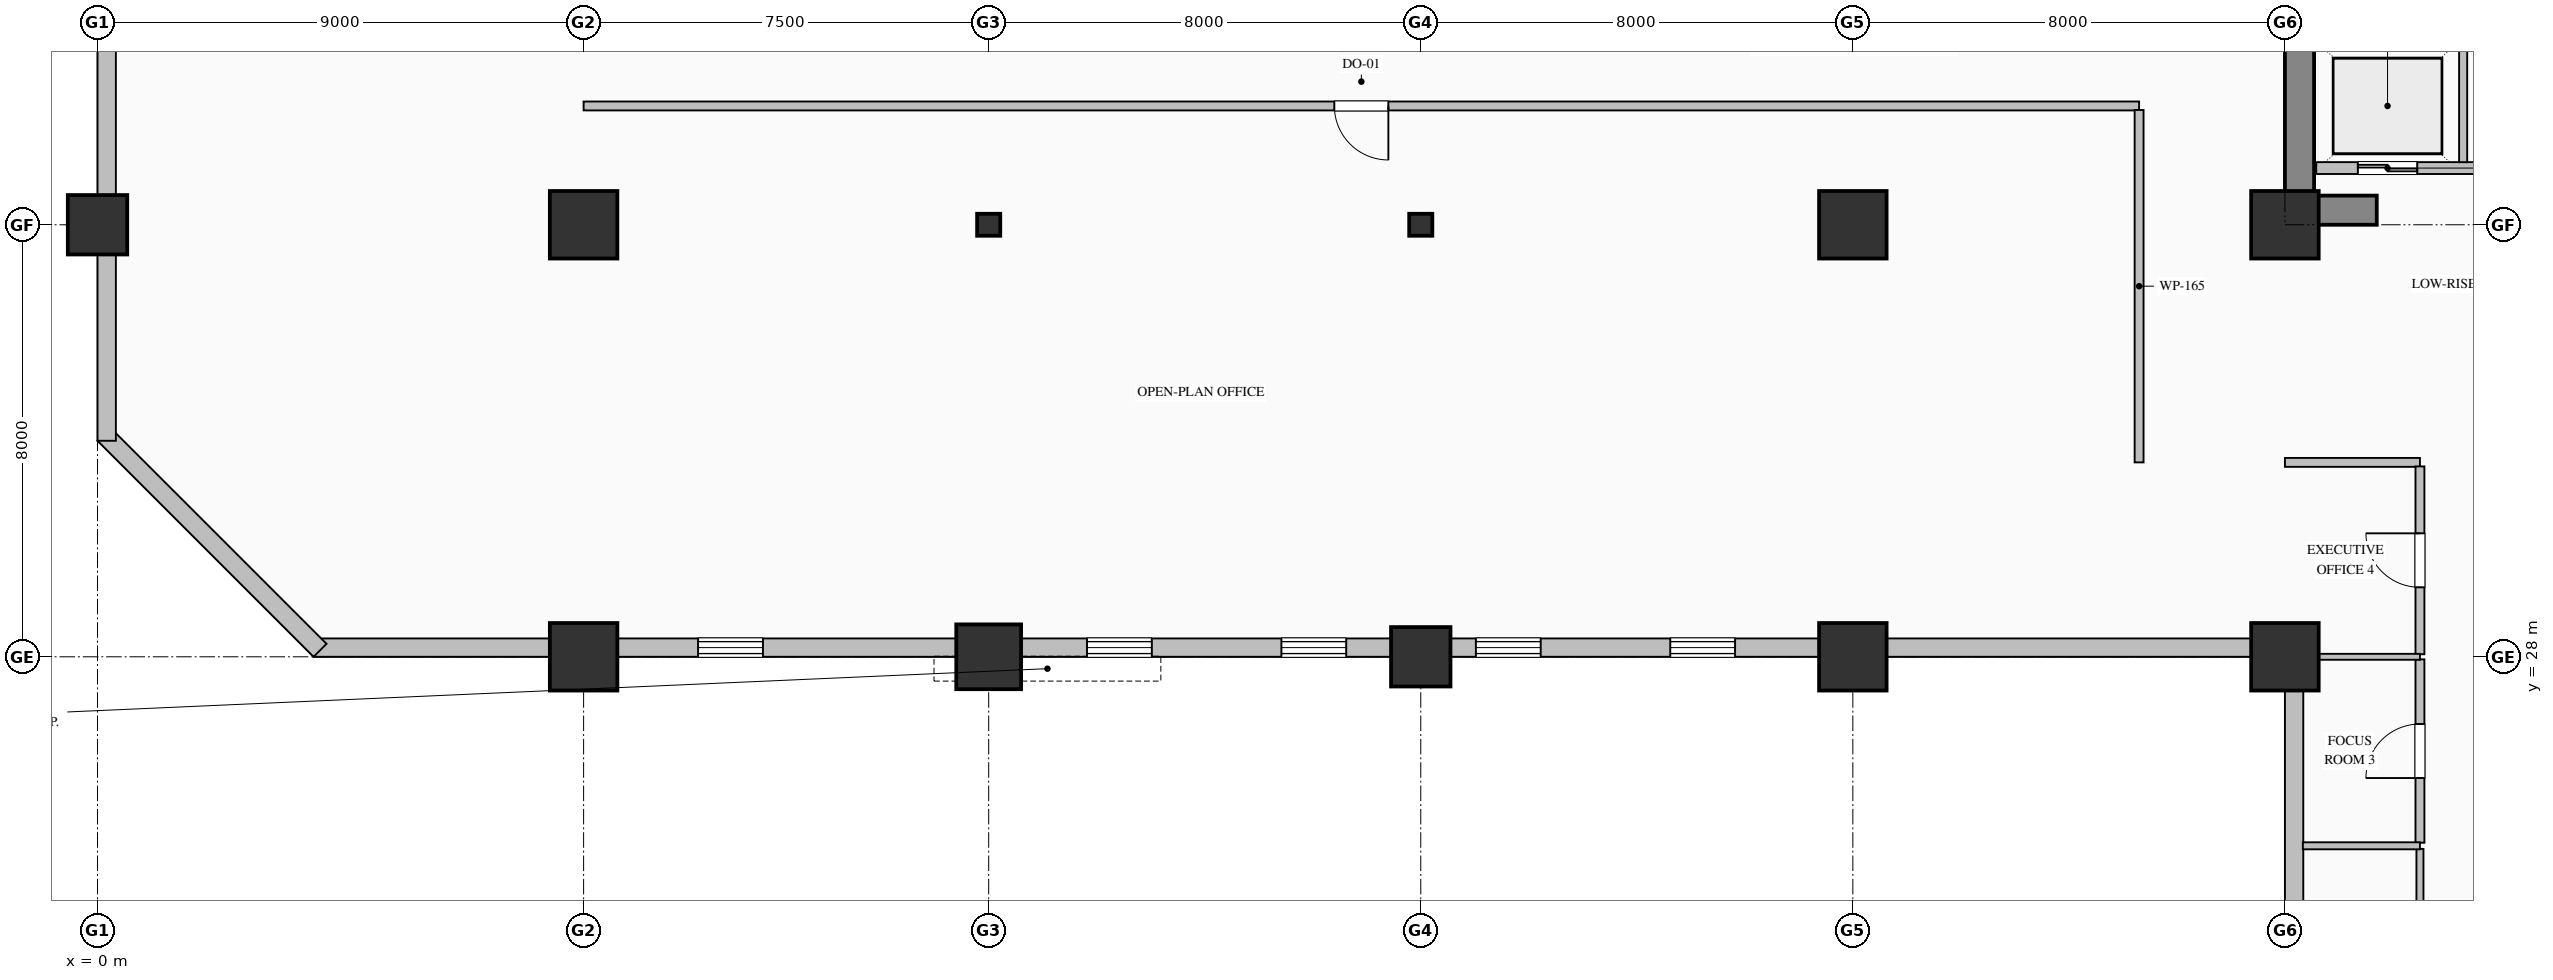
"""IFC4 building model, lengths in metres.
Left out: names, types, materials, properties, quantities, classifications, styles, units other than length and angle.
Written with IfcOpenShell. Run it as: python <this file> out.ifc"""

import sys

from ifc_helpers import new_model, si_unit, direction, frame, frame_2d, origin, origin_2d, place, context, subcontext, project, spatial, rectangle, hollow_rectangle, hollow_circle, i_section, extrude, element, fill, save


model = new_model("IFC4")
c1 = context("Model", 3, precision=1e-05, world=origin(), true_north=direction((0.0, 1.0)))
c2 = subcontext(c1, "Body", "Model", "MODEL_VIEW")
j1 = project(units=[si_unit("LENGTHUNIT", "METRE"), si_unit("PLANEANGLEUNIT", "RADIAN")], contexts=[c1])
p1 = place(None, origin())
s1 = spatial("IfcSite", under=j1, at=p1, CompositionType="ELEMENT")
p2 = place(p1, origin())
s2 = spatial("IfcBuilding", under=s1, at=p2, CompositionType="ELEMENT")
p3 = place(p2, frame((0.0, 0.0, 40.2)))
s3 = spatial("IfcBuildingStorey", under=s2, at=p3, CompositionType="ELEMENT", Elevation=40.2)
p4 = place(p3, frame((40.77, 36.54, 0.0), z_axis=(0.0, 0.0, 1.0), x_axis=(0.0, 1.0, 0.0)))
e1 = element("IfcWall", 1, at=p4, inside=s3, PredefinedType="SHEAR", context=c2, shape_type="SweptSolid", body=[
    extrude(rectangle(XDim=7.86, YDim=0.54, at=frame_2d((3.93, 0.0))), origin(), (0.0, 0.0, 1.0), 3.75),
])
p5 = place(p3, frame((40.5, 36.27, 0.0), z_axis=(0.0, 0.0, 1.0), x_axis=(1.0, 0.0, 0.0)))
e2 = element("IfcWall", 2, at=p5, inside=s3, PredefinedType="SHEAR", context=c2, shape_type="SweptSolid", body=[
    extrude(rectangle(XDim=1.7, YDim=0.54, at=frame_2d((0.85, 0.0))), origin(), (0.0, 0.0, 1.0), 3.75),
])
p6 = place(p3, frame((0.0, 36.0, 0.0), z_axis=(0.0, 0.0, 1.0), x_axis=(1.0, 0.0, 0.0)))
e3 = element("IfcColumn", 3, at=p6, inside=s3, PredefinedType="COLUMN", context=c2, shape_type="SweptSolid", body=[
    extrude(hollow_rectangle(XDim=1.1, YDim=1.1, WallThickness=0.04, at=origin_2d()), origin(), (0.0, 0.0, 1.0), 4.0),
])
for number, where, z_axis, x_axis in (
    (4, (9.0, 28.0, 0.0), (0.0, 0.0, 1.0), (1.0, 0.0, 0.0)),
    (5, (9.0, 36.0, 0.0), (0.0, 0.0, 1.0), (1.0, 0.0, 0.0)),
):
    element("IfcColumn", number, at=place(p3, frame(where, z_axis=z_axis, x_axis=x_axis)), inside=s3, PredefinedType="COLUMN", context=c2, shape_type="SweptSolid", body=[
        extrude(hollow_rectangle(XDim=1.25, YDim=1.25, WallThickness=0.045, at=origin_2d()), origin(), (0.0, 0.0, 1.0), 4.0),
    ])
p7 = place(p3, frame((16.5, 28.0, 0.0), z_axis=(0.0, 0.0, 1.0), x_axis=(1.0, 0.0, 0.0)))
e6 = element("IfcColumn", 6, at=p7, inside=s3, PredefinedType="COLUMN", context=c2, shape_type="SweptSolid", body=[
    extrude(hollow_circle(Radius=0.6, WallThickness=0.04, at=origin_2d()), origin(), (0.0, 0.0, 1.0), 4.0),
])
p8 = place(p3, frame((16.5, 36.0, 0.0), z_axis=(0.0, 0.0, 1.0), x_axis=(1.0, 0.0, 0.0)))
e7 = element("IfcColumn", 7, at=p8, inside=s3, PredefinedType="COLUMN", context=c2, shape_type="SweptSolid", body=[
    extrude(i_section(OverallWidth=0.407, OverallDepth=0.428, WebThickness=0.02, FlangeThickness=0.035, FilletRadius=0.022, at=origin_2d()), origin(), (0.0, 0.0, 1.0), 4.0),
])
p9 = place(p3, frame((24.5, 28.0, 0.0), z_axis=(0.0, 0.0, 1.0), x_axis=(1.0, 0.0, 0.0)))
e8 = element("IfcColumn", 8, at=p9, inside=s3, PredefinedType="COLUMN", context=c2, shape_type="SweptSolid", body=[
    extrude(hollow_rectangle(XDim=1.1, YDim=1.1, WallThickness=0.04, at=origin_2d()), origin(), (0.0, 0.0, 1.0), 4.0),
])
p10 = place(p3, frame((24.5, 36.0, 0.0), z_axis=(0.0, 0.0, 1.0), x_axis=(1.0, 0.0, 0.0)))
e9 = element("IfcColumn", 9, at=p10, inside=s3, PredefinedType="COLUMN", context=c2, shape_type="SweptSolid", body=[
    extrude(i_section(OverallWidth=0.407, OverallDepth=0.428, WebThickness=0.02, FlangeThickness=0.035, FilletRadius=0.022, at=origin_2d()), origin(), (0.0, 0.0, 1.0), 4.0),
])
for number, where, z_axis, x_axis in (
    (10, (32.5, 28.0, 0.0), (0.0, 0.0, 1.0), (1.0, 0.0, 0.0)),
    (11, (32.5, 36.0, 0.0), (0.0, 0.0, 1.0), (1.0, 0.0, 0.0)),
    (12, (40.5, 28.0, 0.0), (0.0, 0.0, 1.0), (1.0, 0.0, 0.0)),
    (13, (40.5, 36.0, 0.0), (0.0, 0.0, 1.0), (1.0, 0.0, 0.0)),
):
    element("IfcColumn", number, at=place(p3, frame(where, z_axis=z_axis, x_axis=x_axis)), inside=s3, PredefinedType="COLUMN", context=c2, shape_type="SweptSolid", body=[
        extrude(hollow_rectangle(XDim=1.25, YDim=1.25, WallThickness=0.045, at=origin_2d()), origin(), (0.0, 0.0, 1.0), 4.0),
    ])
p11 = place(p3, frame((40.67, 8.0, 0.0), z_axis=(0.0, 0.0, 1.0), x_axis=(0.0, 1.0, 0.0)))
e14 = element("IfcWall", 14, at=p11, inside=s3, PredefinedType="SOLIDWALL", context=c2, shape_type="SweptSolid", body=[
    extrude(rectangle(XDim=20.34, YDim=0.34, at=frame_2d((10.17, 0.0))), origin(), (0.0, 0.0, 1.0), 3.05),
])
p12 = place(p11, frame((6.6, 0.0, 0.7)))
e15 = element("IfcOpeningElement", 15, at=p12, cuts=e14, PredefinedType="OPENING", context=c2, shape_type="SweptSolid", body=[
    extrude(rectangle(XDim=1.2, YDim=1.85, at=frame_2d((0.6, 0.925))), frame((0.0, 0.18, 0.0), z_axis=(0.0, -1.0, 0.0), x_axis=(1.0, 0.0, 0.0)), (0.0, 0.0, 1.0), 0.36),
])
p13 = place(p11, frame((13.8, 0.0, 0.7)))
e16 = element("IfcOpeningElement", 16, at=p13, cuts=e14, PredefinedType="OPENING", context=c2, shape_type="SweptSolid", body=[
    extrude(rectangle(XDim=1.2, YDim=1.85, at=frame_2d((0.6, 0.925))), frame((0.0, 0.18, 0.0), z_axis=(0.0, -1.0, 0.0), x_axis=(1.0, 0.0, 0.0)), (0.0, 0.0, 1.0), 0.36),
])
p14 = place(p3, frame((40.52, 28.17, 0.0), z_axis=(0.0, 0.0, 1.0), x_axis=(-1.0, 0.0, 0.0)))
e17 = element("IfcWall", 17, at=p14, inside=s3, PredefinedType="SOLIDWALL", context=c2, shape_type="SweptSolid", body=[
    extrude(rectangle(XDim=36.52, YDim=0.34, at=frame_2d((18.26, 0.0))), origin(), (0.0, 0.0, 1.0), 3.05),
])
p15 = place(p14, frame((10.2, 0.0, 0.7)))
e18 = element("IfcOpeningElement", 18, at=p15, cuts=e17, PredefinedType="OPENING", context=c2, shape_type="SweptSolid", body=[
    extrude(rectangle(XDim=1.2, YDim=1.85, at=frame_2d((0.6, 0.925))), frame((0.0, 0.18, 0.0), z_axis=(0.0, -1.0, 0.0), x_axis=(1.0, 0.0, 0.0)), (0.0, 0.0, 1.0), 0.36),
])
p16 = place(p14, frame((13.8, 0.0, 0.7)))
e19 = element("IfcOpeningElement", 19, at=p16, cuts=e17, PredefinedType="OPENING", context=c2, shape_type="SweptSolid", body=[
    extrude(rectangle(XDim=1.2, YDim=1.85, at=frame_2d((0.6, 0.925))), frame((0.0, 0.18, 0.0), z_axis=(0.0, -1.0, 0.0), x_axis=(1.0, 0.0, 0.0)), (0.0, 0.0, 1.0), 0.36),
])
p17 = place(p14, frame((17.4, 0.0, 0.7)))
e20 = element("IfcOpeningElement", 20, at=p17, cuts=e17, PredefinedType="OPENING", context=c2, shape_type="SweptSolid", body=[
    extrude(rectangle(XDim=1.2, YDim=1.85, at=frame_2d((0.6, 0.925))), frame((0.0, 0.18, 0.0), z_axis=(0.0, -1.0, 0.0), x_axis=(1.0, 0.0, 0.0)), (0.0, 0.0, 1.0), 0.36),
])
p18 = place(p14, frame((21.0, 0.0, 0.7)))
e21 = element("IfcOpeningElement", 21, at=p18, cuts=e17, PredefinedType="OPENING", context=c2, shape_type="SweptSolid", body=[
    extrude(rectangle(XDim=1.2, YDim=1.85, at=frame_2d((0.6, 0.925))), frame((0.0, 0.18, 0.0), z_axis=(0.0, -1.0, 0.0), x_axis=(1.0, 0.0, 0.0)), (0.0, 0.0, 1.0), 0.36),
])
p19 = place(p14, frame((28.2, 0.0, 0.7)))
e22 = element("IfcOpeningElement", 22, at=p19, cuts=e17, PredefinedType="OPENING", context=c2, shape_type="SweptSolid", body=[
    extrude(rectangle(XDim=1.2, YDim=1.85, at=frame_2d((0.6, 0.925))), frame((0.0, 0.18, 0.0), z_axis=(0.0, -1.0, 0.0), x_axis=(1.0, 0.0, 0.0)), (0.0, 0.0, 1.0), 0.36),
])
p20 = place(p3, frame((4.12, 28.12, 0.0), z_axis=(0.0, 0.0, 1.0), x_axis=(-0.707106781187, 0.707106781187, 0.0)))
e23 = element("IfcWall", 23, at=p20, inside=s3, PredefinedType="SOLIDWALL", context=c2, shape_type="SweptSolid", body=[
    extrude(rectangle(XDim=5.657, YDim=0.34, at=frame_2d((2.828, 0.0))), origin(), (0.0, 0.0, 1.0), 3.75),
])
p21 = place(p3, frame((0.17, 32.0, 0.0), z_axis=(0.0, 0.0, 1.0), x_axis=(0.0, 1.0, 0.0)))
e24 = element("IfcWall", 24, at=p21, inside=s3, PredefinedType="SOLIDWALL", context=c2, shape_type="SweptSolid", body=[
    extrude(rectangle(XDim=16.0, YDim=0.34, at=frame_2d((8.0, 0.0))), origin(), (0.0, 0.0, 1.0), 3.25),
])
p22 = place(p3, frame((49.32, 37.05, 0.0), z_axis=(0.0, 0.0, 1.0), x_axis=(-1.0, 0.0, 0.0)))
e25 = element("IfcWall", 25, at=p22, inside=s3, PredefinedType="PARTITIONING", context=c2, shape_type="SweptSolid", body=[
    extrude(rectangle(XDim=8.24, YDim=0.22, at=frame_2d((4.12, 0.0))), origin(), (0.0, 0.0, 1.0), 3.75),
])
p23 = place(p22, frame((6.37, 0.0, 0.0)))
e26 = element("IfcOpeningElement", 26, at=p23, cuts=e25, PredefinedType="OPENING", context=c2, shape_type="SweptSolid", body=[
    extrude(rectangle(XDim=1.1, YDim=2.2, at=frame_2d((0.55, 1.1))), frame((0.0, 0.12, 0.0), z_axis=(0.0, -1.0, 0.0), x_axis=(1.0, 0.0, 0.0)), (0.0, 0.0, 1.0), 0.24),
])
p24 = place(p22, frame((3.57, 0.0, 0.0)))
e27 = element("IfcOpeningElement", 27, at=p24, cuts=e25, PredefinedType="OPENING", context=c2, shape_type="SweptSolid", body=[
    extrude(rectangle(XDim=1.1, YDim=2.2, at=frame_2d((0.55, 1.1))), frame((0.0, 0.12, 0.0), z_axis=(0.0, -1.0, 0.0), x_axis=(1.0, 0.0, 0.0)), (0.0, 0.0, 1.0), 0.24),
])
p25 = place(p22, frame((0.77, 0.0, 0.0)))
e28 = element("IfcOpeningElement", 28, at=p25, cuts=e25, PredefinedType="OPENING", context=c2, shape_type="SweptSolid", body=[
    extrude(rectangle(XDim=1.1, YDim=2.2, at=frame_2d((0.55, 1.1))), frame((0.0, 0.12, 0.0), z_axis=(0.0, -1.0, 0.0), x_axis=(1.0, 0.0, 0.0)), (0.0, 0.0, 1.0), 0.24),
])
p26 = place(p3, frame((43.8, 37.16, 0.0), z_axis=(0.0, 0.0, 1.0), x_axis=(0.0, 1.0, 0.0)))
e29 = element("IfcWall", 29, at=p26, inside=s3, PredefinedType="PARTITIONING", context=c2, shape_type="SweptSolid", body=[
    extrude(rectangle(XDim=2.08, YDim=0.15, at=frame_2d((1.04, 0.0))), origin(), (0.0, 0.0, 1.0), 3.75),
])
p27 = place(p3, frame((37.8, 38.2, 0.0), z_axis=(0.0, 0.0, 1.0), x_axis=(-1.0, 0.0, 0.0)))
e30 = element("IfcWall", 30, at=p27, inside=s3, PredefinedType="PARTITIONING", context=c2, shape_type="SweptSolid", body=[
    extrude(rectangle(XDim=28.8, YDim=0.165, at=frame_2d((14.4, 0.0))), origin(), (0.0, 0.0, 1.0), 3.75),
])
p28 = place(p27, frame((13.9, 0.0, 0.0)))
e31 = element("IfcOpeningElement", 31, at=p28, cuts=e30, PredefinedType="OPENING", context=c2, shape_type="SweptSolid", body=[
    extrude(rectangle(XDim=1.0, YDim=2.15, at=frame_2d((0.5, 1.075))), frame((0.0, 0.093, 0.0), z_axis=(0.0, -1.0, 0.0), x_axis=(1.0, 0.0, 0.0)), (0.0, 0.0, 1.0), 0.185),
])
p29 = place(p3, frame((37.8, 31.6, 0.0), z_axis=(0.0, 0.0, 1.0), x_axis=(0.0, 1.0, 0.0)))
e32 = element("IfcWall", 32, at=p29, inside=s3, PredefinedType="PARTITIONING", context=c2, shape_type="SweptSolid", body=[
    extrude(rectangle(XDim=6.525, YDim=0.165, at=frame_2d((3.263, 0.0))), origin(), (0.0, 0.0, 1.0), 3.75),
])
p30 = place(p3, frame((43.0, 31.6, 0.0), z_axis=(0.0, 0.0, 1.0), x_axis=(-1.0, 0.0, 0.0)))
e33 = element("IfcWall", 33, at=p30, inside=s3, PredefinedType="PARTITIONING", context=c2, shape_type="SweptSolid", body=[
    extrude(rectangle(XDim=2.5, YDim=0.165, at=frame_2d((1.25, 0.0))), origin(), (0.0, 0.0, 1.0), 3.75),
])
p31 = place(p3, frame((43.0, 18.557, 0.0), z_axis=(0.0, 0.0, 1.0), x_axis=(0.0, 1.0, 0.0)))
e34 = element("IfcWall", 34, at=p31, inside=s3, PredefinedType="PARTITIONING", context=c2, shape_type="SweptSolid", body=[
    extrude(rectangle(XDim=5.886, YDim=0.13, at=frame_2d((2.943, 0.0))), origin(), (0.0, 0.0, 1.0), 3.75),
])
p32 = place(p31, frame((2.443, 0.0, 0.0)))
e35 = element("IfcOpeningElement", 35, at=p32, cuts=e34, PredefinedType="OPENING", context=c2, shape_type="SweptSolid", body=[
    extrude(rectangle(XDim=1.0, YDim=2.15, at=frame_2d((0.5, 1.075))), frame((0.0, 0.075, 0.0), z_axis=(0.0, -1.0, 0.0), x_axis=(1.0, 0.0, 0.0)), (0.0, 0.0, 1.0), 0.15),
])
p33 = place(p3, frame((43.0, 24.557, 0.0), z_axis=(0.0, 0.0, 1.0), x_axis=(0.0, 1.0, 0.0)))
e36 = element("IfcWall", 36, at=p33, inside=s3, PredefinedType="PARTITIONING", context=c2, shape_type="SweptSolid", body=[
    extrude(rectangle(XDim=3.396, YDim=0.165, at=frame_2d((1.698, 0.0))), origin(), (0.0, 0.0, 1.0), 3.75),
])
p34 = place(p33, frame((1.198, 0.0, 0.0)))
e37 = element("IfcOpeningElement", 37, at=p34, cuts=e36, PredefinedType="OPENING", context=c2, shape_type="SweptSolid", body=[
    extrude(rectangle(XDim=1.0, YDim=2.15, at=frame_2d((0.5, 1.075))), frame((0.0, 0.093, 0.0), z_axis=(0.0, -1.0, 0.0), x_axis=(1.0, 0.0, 0.0)), (0.0, 0.0, 1.0), 0.185),
])
p35 = place(p3, frame((43.0, 28.047, 0.0), z_axis=(0.0, 0.0, 1.0), x_axis=(0.0, 1.0, 0.0)))
e38 = element("IfcWall", 38, at=p35, inside=s3, PredefinedType="PARTITIONING", context=c2, shape_type="SweptSolid", body=[
    extrude(rectangle(XDim=3.478, YDim=0.165, at=frame_2d((1.739, 0.0))), origin(), (0.0, 0.0, 1.0), 3.75),
])
p36 = place(p35, frame((1.239, 0.0, 0.0)))
e39 = element("IfcOpeningElement", 39, at=p36, cuts=e38, PredefinedType="OPENING", context=c2, shape_type="SweptSolid", body=[
    extrude(rectangle(XDim=1.0, YDim=2.15, at=frame_2d((0.5, 1.075))), frame((0.0, 0.093, 0.0), z_axis=(0.0, -1.0, 0.0), x_axis=(1.0, 0.0, 0.0)), (0.0, 0.0, 1.0), 0.185),
])
p37 = place(p3, frame((40.832, 24.5, 0.0), z_axis=(0.0, 0.0, 1.0), x_axis=(1.0, 0.0, 0.0)))
e40 = element("IfcWall", 40, at=p37, inside=s3, PredefinedType="PARTITIONING", context=c2, shape_type="SweptSolid", body=[
    extrude(rectangle(XDim=2.168, YDim=0.13, at=frame_2d((1.084, 0.0))), origin(), (0.0, 0.0, 1.0), 3.75),
])
p38 = place(p3, frame((40.832, 28.0, 0.0), z_axis=(0.0, 0.0, 1.0), x_axis=(1.0, 0.0, 0.0)))
e41 = element("IfcWall", 41, at=p38, inside=s3, PredefinedType="MOVABLE", context=c2, shape_type="SweptSolid", body=[
    extrude(rectangle(XDim=2.168, YDim=0.11, at=frame_2d((1.084, 0.0))), origin(), (0.0, 0.0, 1.0), 3.042),
])
p39 = place(p15, origin())
e42 = element("IfcWindow", 42, at=p39, inside=s3, PartitioningType="DOUBLE_PANEL_VERTICAL", PredefinedType="WINDOW", context=c2, shape_type="SweptSolid", body=[
    extrude(rectangle(XDim=1.2, YDim=1.85, at=frame_2d((0.6, 0.925))), frame((0.0, 0.15, 0.0), z_axis=(0.0, -1.0, 0.0), x_axis=(1.0, 0.0, 0.0)), (0.0, 0.0, 1.0), 0.06),
])
fill(e18, e42)
p40 = place(p16, origin())
e43 = element("IfcWindow", 43, at=p40, inside=s3, PartitioningType="DOUBLE_PANEL_VERTICAL", PredefinedType="WINDOW", context=c2, shape_type="SweptSolid", body=[
    extrude(rectangle(XDim=1.2, YDim=1.85, at=frame_2d((0.6, 0.925))), frame((0.0, 0.15, 0.0), z_axis=(0.0, -1.0, 0.0), x_axis=(1.0, 0.0, 0.0)), (0.0, 0.0, 1.0), 0.06),
])
fill(e19, e43)
p41 = place(p17, origin())
e44 = element("IfcWindow", 44, at=p41, inside=s3, PartitioningType="DOUBLE_PANEL_VERTICAL", PredefinedType="WINDOW", context=c2, shape_type="SweptSolid", body=[
    extrude(rectangle(XDim=1.2, YDim=1.85, at=frame_2d((0.6, 0.925))), frame((0.0, 0.15, 0.0), z_axis=(0.0, -1.0, 0.0), x_axis=(1.0, 0.0, 0.0)), (0.0, 0.0, 1.0), 0.06),
])
fill(e20, e44)
p42 = place(p18, origin())
e45 = element("IfcWindow", 45, at=p42, inside=s3, PartitioningType="DOUBLE_PANEL_VERTICAL", PredefinedType="WINDOW", context=c2, shape_type="SweptSolid", body=[
    extrude(rectangle(XDim=1.2, YDim=1.85, at=frame_2d((0.6, 0.925))), frame((0.0, 0.15, 0.0), z_axis=(0.0, -1.0, 0.0), x_axis=(1.0, 0.0, 0.0)), (0.0, 0.0, 1.0), 0.06),
])
fill(e21, e45)
p43 = place(p19, origin())
e46 = element("IfcWindow", 46, at=p43, inside=s3, PartitioningType="DOUBLE_PANEL_VERTICAL", PredefinedType="WINDOW", context=c2, shape_type="SweptSolid", body=[
    extrude(rectangle(XDim=1.2, YDim=1.85, at=frame_2d((0.6, 0.925))), frame((0.0, 0.15, 0.0), z_axis=(0.0, -1.0, 0.0), x_axis=(1.0, 0.0, 0.0)), (0.0, 0.0, 1.0), 0.06),
])
fill(e22, e46)
p44 = place(p23, origin())
e47 = element("IfcDoor", 47, at=p44, inside=s3, OperationType="DOUBLE_DOOR_SLIDING", PredefinedType="DOOR", context=c2, shape_type="SweptSolid", body=[
    extrude(rectangle(XDim=1.1, YDim=2.2, at=frame_2d((0.55, 1.1))), frame((0.0, 0.025, 0.0), z_axis=(0.0, -1.0, 0.0), x_axis=(1.0, 0.0, 0.0)), (0.0, 0.0, 1.0), 0.05),
])
fill(e26, e47)
p45 = place(p28, origin())
e48 = element("IfcDoor", 48, at=p45, inside=s3, OperationType="SINGLE_SWING_LEFT", PredefinedType="DOOR", context=c2, shape_type="SweptSolid", body=[
    extrude(rectangle(XDim=1.0, YDim=2.15, at=frame_2d((0.5, 1.075))), frame((0.0, 0.025, 0.0), z_axis=(0.0, -1.0, 0.0), x_axis=(1.0, 0.0, 0.0)), (0.0, 0.0, 1.0), 0.05),
])
fill(e31, e48)
p46 = place(p34, origin())
e49 = element("IfcDoor", 49, at=p46, inside=s3, OperationType="SINGLE_SWING_LEFT", PredefinedType="DOOR", context=c2, shape_type="SweptSolid", body=[
    extrude(rectangle(XDim=1.0, YDim=2.15, at=frame_2d((0.5, 1.075))), frame((0.0, 0.025, 0.0), z_axis=(0.0, -1.0, 0.0), x_axis=(1.0, 0.0, 0.0)), (0.0, 0.0, 1.0), 0.05),
])
fill(e37, e49)
p47 = place(p36, origin())
e50 = element("IfcDoor", 50, at=p47, inside=s3, OperationType="SINGLE_SWING_RIGHT", PredefinedType="DOOR", context=c2, shape_type="SweptSolid", body=[
    extrude(rectangle(XDim=1.0, YDim=2.15, at=frame_2d((0.5, 1.075))), frame((0.0, 0.025, 0.0), z_axis=(0.0, -1.0, 0.0), x_axis=(1.0, 0.0, 0.0)), (0.0, 0.0, 1.0), 0.05),
])
fill(e39, e50)
save(model, sys.argv[1])
